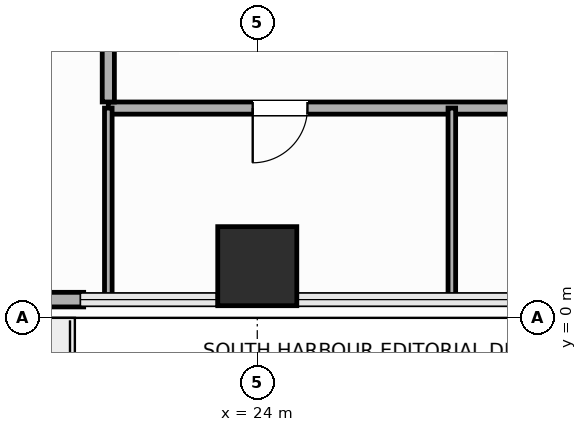
"""IFC4 building model, lengths in metres.
Left out: names, types, materials, properties, quantities, classifications, styles, units other than length and angle.
Written with IfcOpenShell. Run it as: python <this file> out.ifc"""

import sys

from ifc_helpers import new_model, si_unit, direction, frame, frame_2d, origin, origin_2d, place, context, subcontext, project, spatial, rectangle, extrude, element, fill, save


model = new_model("IFC4")
c1 = context("Model", 3, precision=1e-05, world=origin(), true_north=direction((0.0, 1.0)))
c2 = subcontext(c1, "Body", "Model", "MODEL_VIEW")
j1 = project(units=[si_unit("LENGTHUNIT", "METRE"), si_unit("PLANEANGLEUNIT", "RADIAN")], contexts=[c1])
p1 = place(None, origin())
s1 = spatial("IfcSite", under=j1, at=p1, CompositionType="ELEMENT")
p2 = place(p1, origin())
s2 = spatial("IfcBuilding", under=s1, at=p2, CompositionType="ELEMENT")
p3 = place(p2, frame((0.0, 0.0, 48.0)))
s3 = spatial("IfcBuildingStorey", under=s2, at=p3, CompositionType="ELEMENT", Elevation=48.0)
p4 = place(p3, frame((24.0, 0.85, 0.0), z_axis=(0.0, 0.0, 1.0), x_axis=(1.0, 0.0, 0.0)))
e1 = element("IfcColumn", 1, at=p4, inside=s3, PredefinedType="COLUMN", context=c2, shape_type="SweptSolid", body=[
    extrude(rectangle(XDim=1.3, YDim=1.3, at=origin_2d()), origin(), (0.0, 0.0, 1.0), 3.9),
])
p5 = place(p3, frame((21.145, 0.3, 0.0), z_axis=(0.0, 0.0, 1.0), x_axis=(-1.0, 0.0, 0.0)))
e2 = element("IfcWall", 2, at=p5, inside=s3, PredefinedType="SOLIDWALL", context=c2, shape_type="SweptSolid", body=[
    extrude(rectangle(XDim=9.29, YDim=0.24, at=frame_2d((4.645, 0.0))), origin(), (0.0, 0.0, 1.0), 3.65),
])
p6 = place(p5, frame((4.45, 0.0, 0.0)))
e3 = element("IfcOpeningElement", 3, at=p6, cuts=e2, PredefinedType="OPENING", context=c2, shape_type="SweptSolid", body=[
    extrude(rectangle(XDim=1.05, YDim=2.2, at=frame_2d((0.525, 1.1))), frame((0.0, 0.13, 0.0), z_axis=(0.0, -1.0, 0.0), x_axis=(1.0, 0.0, 0.0)), (0.0, 0.0, 1.0), 0.26),
])
p7 = place(p3, frame((36.15, 3.45, 0.0), z_axis=(0.0, 0.0, 1.0), x_axis=(-1.0, 0.0, 0.0)))
e4 = element("IfcWall", 4, at=p7, inside=s3, PredefinedType="PARTITIONING", context=c2, shape_type="SweptSolid", body=[
    extrude(rectangle(XDim=14.6, YDim=0.2, at=frame_2d((7.3, 0.0))), origin(), (0.0, 0.0, 1.0), 3.142),
])
p8 = place(p7, frame((11.325, 0.0, 0.0)))
e5 = element("IfcOpeningElement", 5, at=p8, cuts=e4, PredefinedType="OPENING", context=c2, shape_type="SweptSolid", body=[
    extrude(rectangle(XDim=0.9, YDim=2.1, at=frame_2d((0.45, 1.05))), frame((0.0, 0.11, 0.0), z_axis=(0.0, -1.0, 0.0), x_axis=(1.0, 0.0, 0.0)), (0.0, 0.0, 1.0), 0.22),
])
p9 = place(p7, frame((5.7, 0.0, 0.0)))
e6 = element("IfcOpeningElement", 6, at=p9, cuts=e4, PredefinedType="OPENING", context=c2, shape_type="SweptSolid", body=[
    extrude(rectangle(XDim=0.9, YDim=2.1, at=frame_2d((0.45, 1.05))), frame((0.0, 0.11, 0.0), z_axis=(0.0, -1.0, 0.0), x_axis=(1.0, 0.0, 0.0)), (0.0, 0.0, 1.0), 0.22),
])
p10 = place(p3, frame((21.55, 3.55, 0.0), z_axis=(0.0, 0.0, 1.0), x_axis=(0.0, 1.0, 0.0)))
e7 = element("IfcWall", 7, at=p10, inside=s3, PredefinedType="PARTITIONING", context=c2, shape_type="SweptSolid", body=[
    extrude(rectangle(XDim=2.25, YDim=0.2, at=frame_2d((1.125, 0.0))), origin(), (0.0, 0.0, 1.0), 3.65),
])
for number, where, z_axis, x_axis in (
    (8, (21.55, 0.3, 0.0), (0.0, 0.0, 1.0), (0.0, 1.0, 0.0)),
    (9, (27.2, 0.3, 0.0), (0.0, 0.0, 1.0), (0.0, 1.0, 0.0)),
):
    element("IfcWall", number, at=place(p3, frame(where, z_axis=z_axis, x_axis=x_axis)), inside=s3, PredefinedType="PARTITIONING", context=c2, shape_type="SweptSolid", body=[
        extrude(rectangle(XDim=3.15, YDim=0.125, at=frame_2d((1.575, 0.0))), origin(), (0.0, 0.0, 1.0), 3.65),
    ])
p11 = place(p8, origin())
e10 = element("IfcDoor", 10, at=p11, inside=s3, OperationType="SINGLE_SWING_RIGHT", PredefinedType="DOOR", context=c2, shape_type="SweptSolid", body=[
    extrude(rectangle(XDim=0.9, YDim=2.1, at=frame_2d((0.45, 1.05))), frame((0.0, 0.025, 0.0), z_axis=(0.0, -1.0, 0.0), x_axis=(1.0, 0.0, 0.0)), (0.0, 0.0, 1.0), 0.05),
])
fill(e5, e10)
save(model, sys.argv[1])
